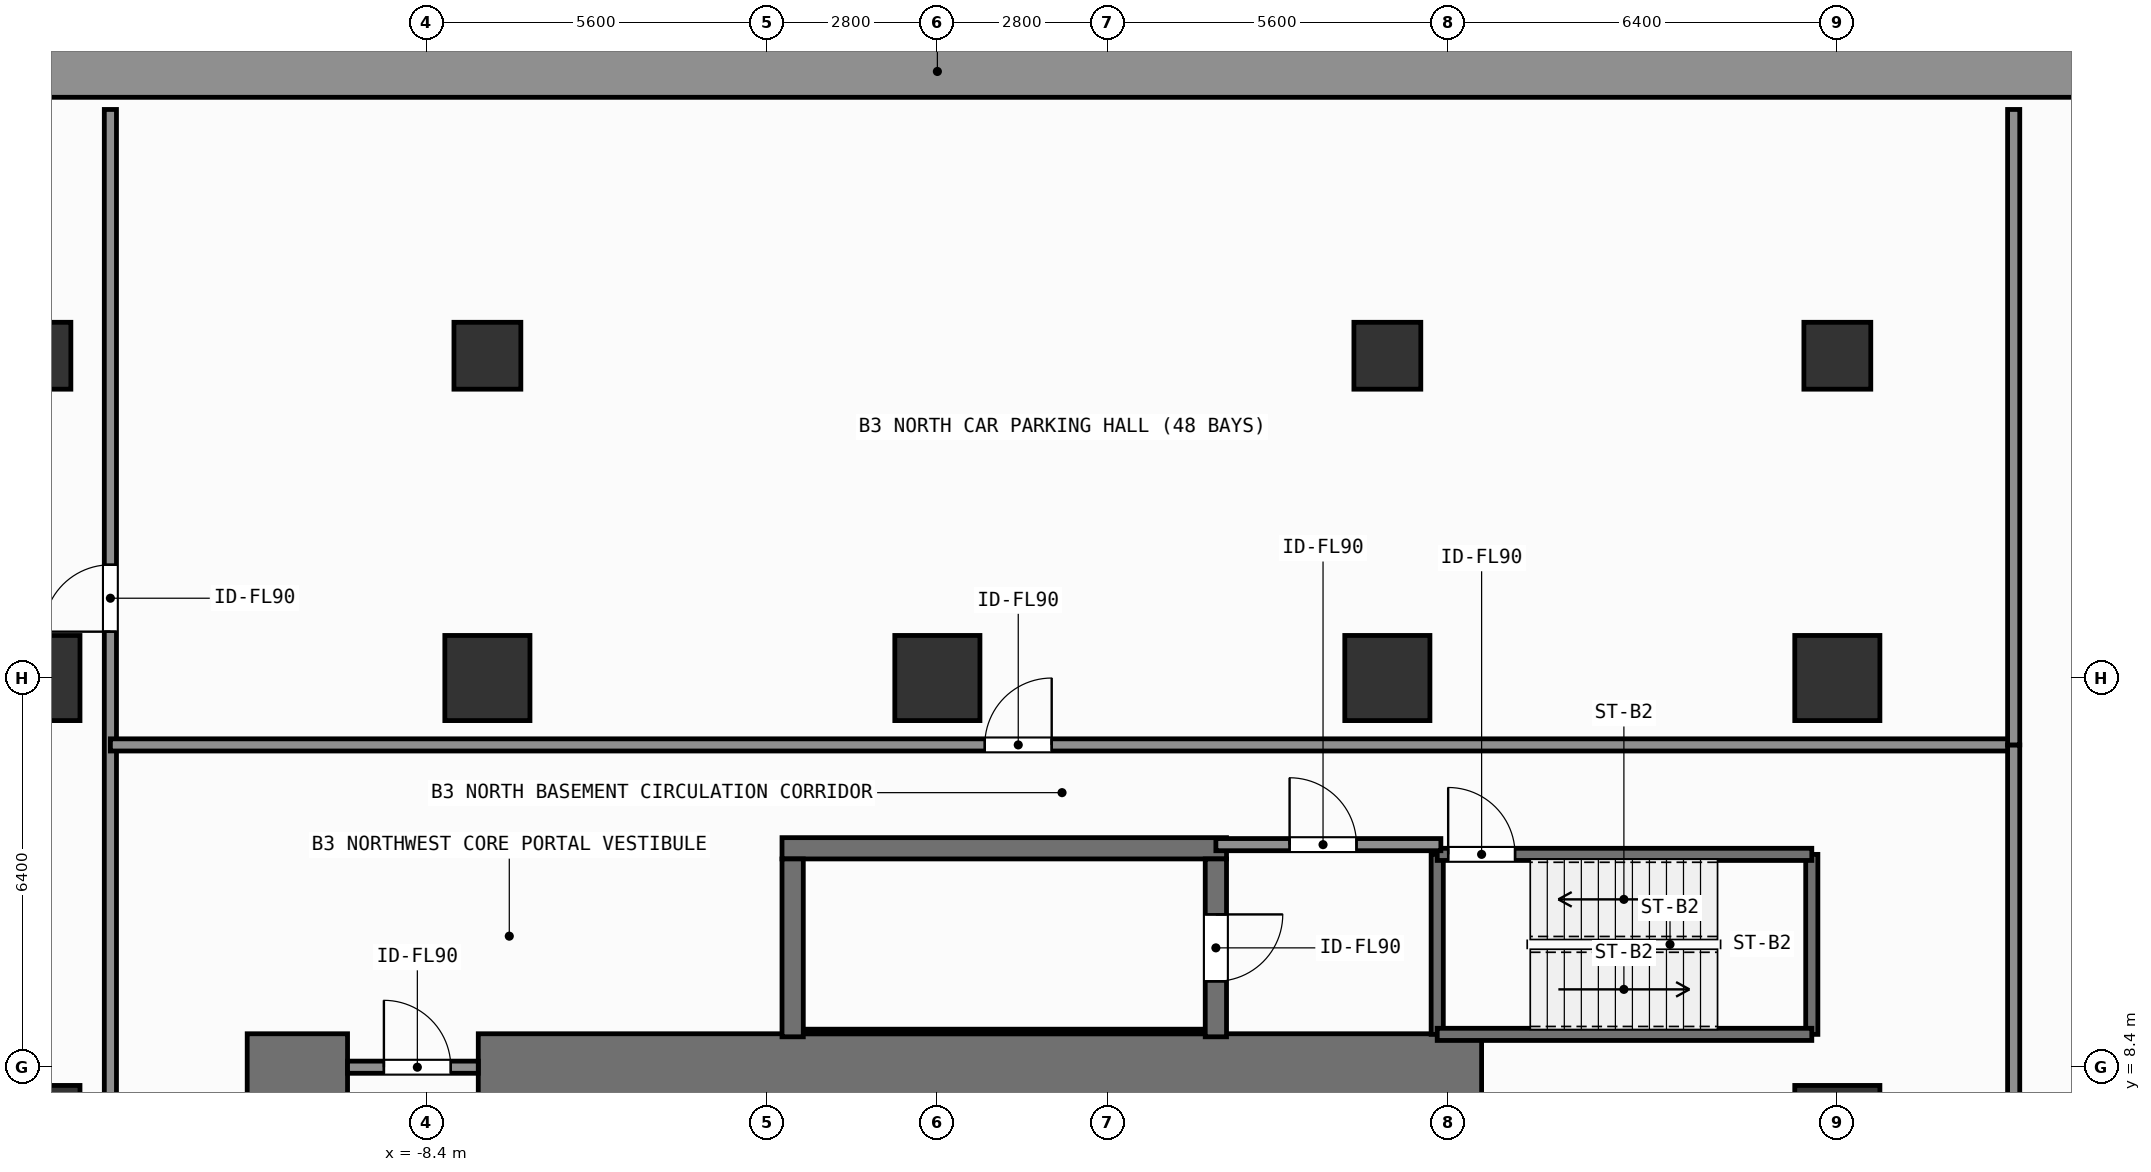
"""IFC4 building model, lengths in metres.
Left out: names, types, materials, properties, quantities, classifications, styles, units other than length and angle.
Written with IfcOpenShell. Run it as: python <this file> out.ifc"""

import sys

from ifc_helpers import new_model, si_unit, direction, frame, frame_2d, origin, origin_2d, place, context, subcontext, project, spatial, rectangle, extrude, element, fill, save


model = new_model("IFC4")
c1 = context("Model", 3, precision=1e-05, world=origin(), true_north=direction((0.0, 1.0)))
c2 = subcontext(c1, "Body", "Model", "MODEL_VIEW")
j1 = project(units=[si_unit("LENGTHUNIT", "METRE"), si_unit("PLANEANGLEUNIT", "RADIAN")], contexts=[c1])
p1 = place(None, origin())
s1 = spatial("IfcSite", under=j1, at=p1, CompositionType="ELEMENT")
p2 = place(p1, origin())
s2 = spatial("IfcBuilding", under=s1, at=p2, CompositionType="ELEMENT")
p3 = place(p2, frame((0.0, 0.0, -12.6)))
s3 = spatial("IfcBuildingStorey", under=s2, at=p3, CompositionType="ELEMENT", Elevation=-12.6)
p4 = place(p3, frame((-33.6, 24.775, 0.0), z_axis=(0.0, 0.0, 1.0), x_axis=(1.0, 0.0, 0.0)))
e1 = element("IfcWall", 1, at=p4, inside=s3, PredefinedType="SOLIDWALL", context=c2, shape_type="SweptSolid", body=[
    extrude(rectangle(XDim=67.2, YDim=0.85, at=frame_2d((33.6, 0.0))), origin(), (0.0, 0.0, 1.0), 4.2),
])
p5 = place(p3, frame((-11.35, 8.4, 0.0), z_axis=(0.0, 0.0, 1.0), x_axis=(1.0, 0.0, 0.0)))
e2 = element("IfcWall", 2, at=p5, inside=s3, PredefinedType="SHEAR", context=c2, shape_type="SweptSolid", body=[
    extrude(rectangle(XDim=1.65, YDim=1.1, at=frame_2d((0.825, 0.0))), origin(), (0.0, 0.0, 1.0), 4.2),
])
p6 = place(p3, frame((-7.55, 8.4, 0.0), z_axis=(0.0, 0.0, 1.0), x_axis=(1.0, 0.0, 0.0)))
e3 = element("IfcWall", 3, at=p6, inside=s3, PredefinedType="SHEAR", context=c2, shape_type="SweptSolid", body=[
    extrude(rectangle(XDim=16.5, YDim=1.1, at=frame_2d((8.25, 0.0))), origin(), (0.0, 0.0, 1.0), 4.2),
])
p7 = place(p3, frame((-2.555, 12.0, 0.0), z_axis=(0.0, 0.0, 1.0), x_axis=(1.0, 0.0, 0.0)))
e4 = element("IfcWall", 4, at=p7, inside=s3, PredefinedType="SHEAR", context=c2, shape_type="SweptSolid", body=[
    extrude(rectangle(XDim=7.31, YDim=0.35, at=frame_2d((3.655, 0.0))), origin(), (0.0, 0.0, 1.0), 4.2),
])
p8 = place(p3, frame((-2.2, 8.988, 0.0), z_axis=(0.0, 0.0, 1.0), x_axis=(1.0, 0.0, 0.0)))
e5 = element("IfcWall", 5, at=p8, inside=s3, PredefinedType="SHEAR", context=c2, shape_type="SweptSolid", body=[
    extrude(rectangle(XDim=6.6, YDim=0.075, at=frame_2d((3.3, 0.0))), origin(), (0.0, 0.0, 1.0), 4.2),
])
p9 = place(p3, frame((-2.38, 8.9, 0.0), z_axis=(0.0, 0.0, 1.0), x_axis=(0.0, 1.0, 0.0)))
e6 = element("IfcWall", 6, at=p9, inside=s3, PredefinedType="SHEAR", context=c2, shape_type="SweptSolid", body=[
    extrude(rectangle(XDim=2.925, YDim=0.35, at=frame_2d((1.462, 0.0))), origin(), (0.0, 0.0, 1.0), 4.2),
])
p10 = place(p3, frame((4.58, 11.825, 0.0), z_axis=(0.0, 0.0, 1.0), x_axis=(0.0, -1.0, 0.0)))
e7 = element("IfcWall", 7, at=p10, inside=s3, PredefinedType="SHEAR", context=c2, shape_type="SweptSolid", body=[
    extrude(rectangle(XDim=2.925, YDim=0.35, at=frame_2d((1.462, 0.0))), origin(), (0.0, 0.0, 1.0), 4.2),
])
p11 = place(p10, frame((0.913, 0.0, 0.0)))
e8 = element("IfcOpeningElement", 8, at=p11, cuts=e7, PredefinedType="OPENING", context=c2, shape_type="SweptSolid", body=[
    extrude(rectangle(XDim=1.1, YDim=2.15, at=frame_2d((0.55, 1.075))), frame((0.0, 0.185, 0.0), z_axis=(0.0, -1.0, 0.0), x_axis=(1.0, 0.0, 0.0)), (0.0, 0.0, 1.0), 0.37),
])
for number, where, z_axis, x_axis in (
    (9, (-14.8, 14.8, 0.0), (0.0, 0.0, 1.0), (1.0, 0.0, 0.0)),
    (10, (-7.4, 14.8, 0.0), (0.0, 0.0, 1.0), (1.0, 0.0, 0.0)),
    (11, (0.0, 14.8, 0.0), (0.0, 0.0, 1.0), (1.0, 0.0, 0.0)),
    (12, (7.4, 14.8, 0.0), (0.0, 0.0, 1.0), (1.0, 0.0, 0.0)),
    (13, (14.8, 14.8, 0.0), (0.0, 0.0, 1.0), (1.0, 0.0, 0.0)),
    (14, (-14.8, 7.4, 0.0), (0.0, 0.0, 1.0), (1.0, 0.0, 0.0)),
    (15, (14.8, 7.4, 0.0), (0.0, 0.0, 1.0), (1.0, 0.0, 0.0)),
):
    element("IfcColumn", number, at=place(p3, frame(where, z_axis=z_axis, x_axis=x_axis)), inside=s3, PredefinedType="COLUMN", context=c2, shape_type="SweptSolid", body=[
        extrude(rectangle(XDim=1.4, YDim=1.4, at=origin_2d()), origin(), (0.0, 0.0, 1.0), 4.2),
    ])
for number, where, z_axis, x_axis in (
    (16, (-14.8, 20.1, 0.0), (0.0, 0.0, 1.0), (1.0, 0.0, 0.0)),
    (17, (-7.4, 20.1, 0.0), (0.0, 0.0, 1.0), (1.0, 0.0, 0.0)),
    (18, (7.4, 20.1, 0.0), (0.0, 0.0, 1.0), (1.0, 0.0, 0.0)),
    (19, (14.8, 20.1, 0.0), (0.0, 0.0, 1.0), (1.0, 0.0, 0.0)),
):
    element("IfcColumn", number, at=place(p3, frame(where, z_axis=z_axis, x_axis=x_axis)), inside=s3, PredefinedType="COLUMN", context=c2, shape_type="SweptSolid", body=[
        extrude(rectangle(XDim=1.1, YDim=1.1, at=origin_2d()), origin(), (0.0, 0.0, 1.0), 4.2),
    ])
for number, where, z_axis, x_axis in (
    (20, (8.22, 8.94, 0.0), (0.0, 0.0, 1.0), (0.0, 1.0, 0.0)),
    (21, (14.38, 11.9, 0.0), (0.0, 0.0, 1.0), (0.0, -1.0, 0.0)),
):
    element("IfcWall", number, at=place(p3, frame(where, z_axis=z_axis, x_axis=x_axis)), inside=s3, PredefinedType="SHEAR", context=c2, shape_type="SweptSolid", body=[
        extrude(rectangle(XDim=2.96, YDim=0.2, at=frame_2d((1.48, 0.0))), origin(), (0.0, 0.0, 1.0), 3.94),
    ])
p12 = place(p3, frame((14.38, 8.94, 0.0), z_axis=(0.0, 0.0, 1.0), x_axis=(-1.0, 0.0, 0.0)))
e22 = element("IfcWall", 22, at=p12, inside=s3, PredefinedType="SHEAR", context=c2, shape_type="SweptSolid", body=[
    extrude(rectangle(XDim=6.16, YDim=0.2, at=frame_2d((3.08, 0.0))), origin(), (0.0, 0.0, 1.0), 3.94),
])
p13 = place(p3, frame((8.22, 11.9, 0.0), z_axis=(0.0, 0.0, 1.0), x_axis=(1.0, 0.0, 0.0)))
e23 = element("IfcWall", 23, at=p13, inside=s3, PredefinedType="SHEAR", context=c2, shape_type="SweptSolid", body=[
    extrude(rectangle(XDim=6.16, YDim=0.2, at=frame_2d((3.08, 0.0))), origin(), (0.0, 0.0, 1.0), 3.94),
])
p14 = place(p13, frame((0.18, 0.0, 0.0)))
e24 = element("IfcOpeningElement", 24, at=p14, cuts=e23, PredefinedType="OPENING", context=c2, shape_type="SweptSolid", body=[
    extrude(rectangle(XDim=1.1, YDim=2.15, at=frame_2d((0.55, 1.075))), frame((0.0, 0.11, 0.0), z_axis=(0.0, -1.0, 0.0), x_axis=(1.0, 0.0, 0.0)), (0.0, 0.0, 1.0), 0.22),
])
p15 = place(p3, frame((4.58, 12.06, 0.0), z_axis=(0.0, 0.0, 1.0), x_axis=(1.0, 0.0, 0.0)))
e25 = element("IfcWall", 25, at=p15, inside=s3, PredefinedType="SOLIDWALL", context=c2, shape_type="SweptSolid", body=[
    extrude(rectangle(XDim=3.7, YDim=0.2, at=frame_2d((1.85, 0.0))), origin(), (0.0, 0.0, 1.0), 3.94),
])
p16 = place(p15, frame((1.212, 0.0, 0.0)))
e26 = element("IfcOpeningElement", 26, at=p16, cuts=e25, PredefinedType="OPENING", context=c2, shape_type="SweptSolid", body=[
    extrude(rectangle(XDim=1.1, YDim=2.15, at=frame_2d((0.55, 1.075))), frame((0.0, 0.11, 0.0), z_axis=(0.0, -1.0, 0.0), x_axis=(1.0, 0.0, 0.0)), (0.0, 0.0, 1.0), 0.22),
])
p17 = place(p3, frame((-9.7, 8.4, 0.0), z_axis=(0.0, 0.0, 1.0), x_axis=(1.0, 0.0, 0.0)))
e27 = element("IfcWall", 27, at=p17, inside=s3, PredefinedType="SOLIDWALL", context=c2, shape_type="SweptSolid", body=[
    extrude(rectangle(XDim=2.15, YDim=0.2, at=frame_2d((1.075, 0.0))), origin(), (0.0, 0.0, 1.0), 2.98),
])
p18 = place(p17, frame((0.598, 0.0, 0.0)))
e28 = element("IfcOpeningElement", 28, at=p18, cuts=e27, PredefinedType="OPENING", context=c2, shape_type="SweptSolid", body=[
    extrude(rectangle(XDim=1.1, YDim=2.15, at=frame_2d((0.55, 1.075))), frame((0.0, 0.11, 0.0), z_axis=(0.0, -1.0, 0.0), x_axis=(1.0, 0.0, 0.0)), (0.0, 0.0, 1.0), 0.22),
])
p19 = place(p3, frame((-13.6, 4.5, 0.0), z_axis=(0.0, 0.0, 1.0), x_axis=(0.0, 1.0, 0.0)))
e29 = element("IfcWall", 29, at=p19, inside=s3, PredefinedType="SOLIDWALL", context=c2, shape_type="SweptSolid", body=[
    extrude(rectangle(XDim=19.65, YDim=0.2, at=frame_2d((9.825, 0.0))), origin(), (0.0, 0.0, 1.0), 3.94),
])
p20 = place(p19, frame((11.062, 0.0, 0.0)))
e30 = element("IfcOpeningElement", 30, at=p20, cuts=e29, PredefinedType="OPENING", context=c2, shape_type="SweptSolid", body=[
    extrude(rectangle(XDim=1.1, YDim=2.15, at=frame_2d((0.55, 1.075))), frame((0.0, 0.11, 0.0), z_axis=(0.0, -1.0, 0.0), x_axis=(1.0, 0.0, 0.0)), (0.0, 0.0, 1.0), 0.22),
])
p21 = place(p3, frame((-13.6, 13.7, 0.0), z_axis=(0.0, 0.0, 1.0), x_axis=(1.0, 0.0, 0.0)))
e31 = element("IfcWall", 31, at=p21, inside=s3, PredefinedType="SOLIDWALL", context=c2, shape_type="SweptSolid", body=[
    extrude(rectangle(XDim=31.3, YDim=0.2, at=frame_2d((15.65, 0.0))), origin(), (0.0, 0.0, 1.0), 3.94),
])
p22 = place(p21, frame((14.38, 0.0, 0.0)))
e32 = element("IfcOpeningElement", 32, at=p22, cuts=e31, PredefinedType="OPENING", context=c2, shape_type="SweptSolid", body=[
    extrude(rectangle(XDim=1.1, YDim=2.15, at=frame_2d((0.55, 1.075))), frame((0.0, 0.11, 0.0), z_axis=(0.0, -1.0, 0.0), x_axis=(1.0, 0.0, 0.0)), (0.0, 0.0, 1.0), 0.22),
])
p23 = place(p3, frame((17.7, -14.55, 0.0), z_axis=(0.0, 0.0, 1.0), x_axis=(0.0, 1.0, 0.0)))
e33 = element("IfcWall", 33, at=p23, inside=s3, PredefinedType="SOLIDWALL", context=c2, shape_type="SweptSolid", body=[
    extrude(rectangle(XDim=28.25, YDim=0.2, at=frame_2d((14.125, 0.0))), origin(), (0.0, 0.0, 1.0), 3.94),
])
p24 = place(p23, frame((15.006, 0.0, 0.0)))
e34 = element("IfcOpeningElement", 34, at=p24, cuts=e33, PredefinedType="OPENING", context=c2, shape_type="SweptSolid", body=[
    extrude(rectangle(XDim=1.1, YDim=2.15, at=frame_2d((0.55, 1.075))), frame((0.0, 0.11, 0.0), z_axis=(0.0, -1.0, 0.0), x_axis=(1.0, 0.0, 0.0)), (0.0, 0.0, 1.0), 0.22),
])
p25 = place(p3, frame((17.7, 13.7, 0.0), z_axis=(0.0, 0.0, 1.0), x_axis=(0.0, 1.0, 0.0)))
e35 = element("IfcWall", 35, at=p25, inside=s3, PredefinedType="SOLIDWALL", context=c2, shape_type="SweptSolid", body=[
    extrude(rectangle(XDim=10.45, YDim=0.2, at=frame_2d((5.225, 0.0))), origin(), (0.0, 0.0, 1.0), 3.94),
])
p26 = place(p11, origin())
e36 = element("IfcDoor", 36, at=p26, inside=s3, OperationType="SINGLE_SWING_LEFT", PredefinedType="DOOR", context=c2, shape_type="SweptSolid", body=[
    extrude(rectangle(XDim=1.1, YDim=2.15, at=frame_2d((0.55, 1.075))), frame((0.0, 0.025, 0.0), z_axis=(0.0, -1.0, 0.0), x_axis=(1.0, 0.0, 0.0)), (0.0, 0.0, 1.0), 0.05),
])
fill(e8, e36)
p27 = place(p14, origin())
e37 = element("IfcDoor", 37, at=p27, inside=s3, OperationType="SINGLE_SWING_LEFT", PredefinedType="DOOR", context=c2, shape_type="SweptSolid", body=[
    extrude(rectangle(XDim=1.1, YDim=2.15, at=frame_2d((0.55, 1.075))), frame((0.0, 0.025, 0.0), z_axis=(0.0, -1.0, 0.0), x_axis=(1.0, 0.0, 0.0)), (0.0, 0.0, 1.0), 0.05),
])
fill(e24, e37)
p28 = place(p16, origin())
e38 = element("IfcDoor", 38, at=p28, inside=s3, OperationType="SINGLE_SWING_LEFT", PredefinedType="DOOR", context=c2, shape_type="SweptSolid", body=[
    extrude(rectangle(XDim=1.1, YDim=2.15, at=frame_2d((0.55, 1.075))), frame((0.0, 0.025, 0.0), z_axis=(0.0, -1.0, 0.0), x_axis=(1.0, 0.0, 0.0)), (0.0, 0.0, 1.0), 0.05),
])
fill(e26, e38)
p29 = place(p18, origin())
e39 = element("IfcDoor", 39, at=p29, inside=s3, OperationType="SINGLE_SWING_LEFT", PredefinedType="DOOR", context=c2, shape_type="SweptSolid", body=[
    extrude(rectangle(XDim=1.1, YDim=2.15, at=frame_2d((0.55, 1.075))), frame((0.0, 0.025, 0.0), z_axis=(0.0, -1.0, 0.0), x_axis=(1.0, 0.0, 0.0)), (0.0, 0.0, 1.0), 0.05),
])
fill(e28, e39)
p30 = place(p20, origin())
e40 = element("IfcDoor", 40, at=p30, inside=s3, OperationType="SINGLE_SWING_LEFT", PredefinedType="DOOR", context=c2, shape_type="SweptSolid", body=[
    extrude(rectangle(XDim=1.1, YDim=2.15, at=frame_2d((0.55, 1.075))), frame((0.0, 0.025, 0.0), z_axis=(0.0, -1.0, 0.0), x_axis=(1.0, 0.0, 0.0)), (0.0, 0.0, 1.0), 0.05),
])
fill(e30, e40)
p31 = place(p22, origin())
e41 = element("IfcDoor", 41, at=p31, inside=s3, OperationType="SINGLE_SWING_RIGHT", PredefinedType="DOOR", context=c2, shape_type="SweptSolid", body=[
    extrude(rectangle(XDim=1.1, YDim=2.15, at=frame_2d((0.55, 1.075))), frame((0.0, 0.025, 0.0), z_axis=(0.0, -1.0, 0.0), x_axis=(1.0, 0.0, 0.0)), (0.0, 0.0, 1.0), 0.05),
])
fill(e32, e41)
save(model, sys.argv[1])
